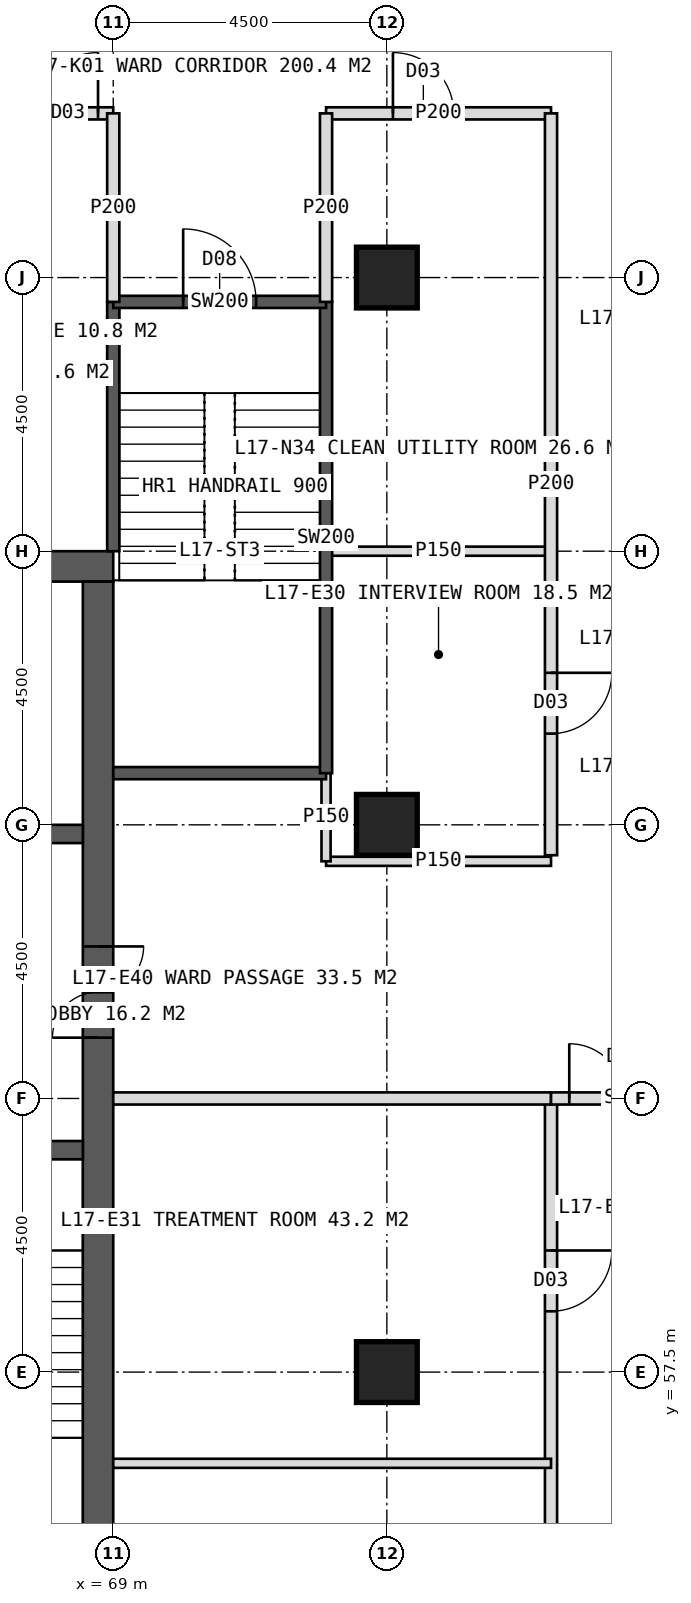
"""IFC4 building model, lengths in metres.
Left out: names, types, materials, properties, quantities, classifications, styles, units other than length and angle.
Written with IfcOpenShell. Run it as: python <this file> out.ifc"""

import sys

from ifc_helpers import new_model, si_unit, direction, frame, frame_2d, origin, origin_2d, place, context, subcontext, project, spatial, rectangle, hollow_rectangle, extrude, element, fill, save


model = new_model("IFC4")
c1 = context("Model", 3, precision=1e-05, world=origin(), true_north=direction((0.0, 1.0)))
c2 = subcontext(c1, "Body", "Model", "MODEL_VIEW")
j1 = project(units=[si_unit("LENGTHUNIT", "METRE"), si_unit("PLANEANGLEUNIT", "RADIAN")], contexts=[c1])
p1 = place(None, origin())
s1 = spatial("IfcSite", under=j1, at=p1, CompositionType="ELEMENT")
p2 = place(p1, origin())
s2 = spatial("IfcBuilding", under=s1, at=p2, CompositionType="ELEMENT")
p3 = place(p2, frame((0.0, 0.0, 75.0)))
s3 = spatial("IfcBuildingStorey", under=s2, at=p3, CompositionType="ELEMENT", Elevation=75.0)
p4 = place(p3, frame((51.0, 70.75, 0.0), z_axis=(0.0, 0.0, 1.0), x_axis=(1.0, 0.0, 0.0)))
e1 = element("IfcWall", 1, at=p4, inside=s3, PredefinedType="SHEAR", context=c2, shape_type="SweptSolid", body=[
    extrude(rectangle(XDim=18.0, YDim=0.5, at=frame_2d((9.0, 0.0))), origin(), (0.0, 0.0, 1.0), 4.0),
])
p5 = place(p4, frame((8.1, 0.0, 0.0)))
e2 = element("IfcOpeningElement", 2, at=p5, cuts=e1, PredefinedType="OPENING", context=c2, shape_type="SweptSolid", body=[
    extrude(rectangle(XDim=1.8, YDim=2.2, at=frame_2d((0.9, 1.1))), frame((0.0, 0.26, 0.0), z_axis=(0.0, -1.0, 0.0), x_axis=(1.0, 0.0, 0.0)), (0.0, 0.0, 1.0), 0.52),
])
p6 = place(p3, frame((68.75, 53.5, 0.0), z_axis=(0.0, 0.0, 1.0), x_axis=(0.0, 1.0, 0.0)))
e3 = element("IfcWall", 3, at=p6, inside=s3, PredefinedType="SHEAR", context=c2, shape_type="SweptSolid", body=[
    extrude(rectangle(XDim=17.0, YDim=0.5, at=frame_2d((8.5, 0.0))), origin(), (0.0, 0.0, 1.0), 4.0),
])
p7 = place(p6, frame((9.5, 0.0, 0.0)))
e4 = element("IfcOpeningElement", 4, at=p7, cuts=e3, PredefinedType="OPENING", context=c2, shape_type="SweptSolid", body=[
    extrude(rectangle(XDim=1.5, YDim=2.2, at=frame_2d((0.75, 1.1))), frame((0.0, 0.26, 0.0), z_axis=(0.0, -1.0, 0.0), x_axis=(1.0, 0.0, 0.0)), (0.0, 0.0, 1.0), 0.52),
])
p8 = place(p3, frame((65.2, 61.15, 0.0), z_axis=(0.0, 0.0, 1.0), x_axis=(1.0, 0.0, 0.0)))
e5 = element("IfcWall", 5, at=p8, inside=s3, PredefinedType="SHEAR", context=c2, shape_type="SweptSolid", body=[
    extrude(rectangle(XDim=3.3, YDim=0.3, at=frame_2d((1.65, 0.0))), origin(), (0.0, 0.0, 1.0), 4.0),
])
p9 = place(p8, frame((1.05, 0.0, 0.0)))
e6 = element("IfcOpeningElement", 6, at=p9, cuts=e5, PredefinedType="OPENING", context=c2, shape_type="SweptSolid", body=[
    extrude(rectangle(XDim=1.2, YDim=2.1, at=frame_2d((0.6, 1.05))), frame((0.0, 0.16, 0.0), z_axis=(0.0, -1.0, 0.0), x_axis=(1.0, 0.0, 0.0)), (0.0, 0.0, 1.0), 0.32),
])
p10 = place(p3, frame((65.2, 66.35, 0.0), z_axis=(0.0, 0.0, 1.0), x_axis=(1.0, 0.0, 0.0)))
e7 = element("IfcWall", 7, at=p10, inside=s3, PredefinedType="SHEAR", context=c2, shape_type="SweptSolid", body=[
    extrude(rectangle(XDim=3.3, YDim=0.3, at=frame_2d((1.65, 0.0))), origin(), (0.0, 0.0, 1.0), 4.0),
])
p11 = place(p10, frame((1.05, 0.0, 0.0)))
e8 = element("IfcOpeningElement", 8, at=p11, cuts=e7, PredefinedType="OPENING", context=c2, shape_type="SweptSolid", body=[
    extrude(rectangle(XDim=1.2, YDim=2.2, at=frame_2d((0.6, 1.1))), frame((0.0, 0.16, 0.0), z_axis=(0.0, -1.0, 0.0), x_axis=(1.0, 0.0, 0.0)), (0.0, 0.0, 1.0), 0.32),
])
for number, where, z_axis, x_axis in (
    (9, (73.5, 75.5, 0.0), (0.0, 0.0, 1.0), (1.0, 0.0, 0.0)),
    (10, (73.5, 57.5, 0.0), (0.0, 0.0, 1.0), (1.0, 0.0, 0.0)),
    (11, (73.5, 66.5, 0.0), (0.0, 0.0, 1.0), (1.0, 0.0, 0.0)),
):
    element("IfcColumn", number, at=place(p3, frame(where, z_axis=z_axis, x_axis=x_axis)), inside=s3, PredefinedType="COLUMN", context=c2, shape_type="SweptSolid", body=[
        extrude(hollow_rectangle(XDim=1.0, YDim=1.0, WallThickness=0.1, at=origin_2d()), origin(), (0.0, 0.0, 1.0), 4.0),
    ])
p12 = place(p3, frame((62.25, 78.2, 0.0), z_axis=(0.0, 0.0, 1.0), x_axis=(1.0, 0.0, 0.0)))
e12 = element("IfcWall", 12, at=p12, inside=s3, PredefinedType="PARTITIONING", context=c2, shape_type="SweptSolid", body=[
    extrude(rectangle(XDim=6.75, YDim=0.2, at=frame_2d((3.375, 0.0))), origin(), (0.0, 0.0, 1.0), 3.75),
])
p13 = place(p12, frame((2.125, 0.0, 0.0)))
e13 = element("IfcOpeningElement", 13, at=p13, cuts=e12, PredefinedType="OPENING", context=c2, shape_type="SweptSolid", body=[
    extrude(rectangle(XDim=1.0, YDim=2.1, at=frame_2d((0.5, 1.05))), frame((0.0, 0.11, 0.0), z_axis=(0.0, -1.0, 0.0), x_axis=(1.0, 0.0, 0.0)), (0.0, 0.0, 1.0), 0.22),
])
p14 = place(p12, frame((5.5, 0.0, 0.0)))
e14 = element("IfcOpeningElement", 14, at=p14, cuts=e12, PredefinedType="OPENING", context=c2, shape_type="SweptSolid", body=[
    extrude(rectangle(XDim=1.0, YDim=2.1, at=frame_2d((0.5, 1.05))), frame((0.0, 0.11, 0.0), z_axis=(0.0, -1.0, 0.0), x_axis=(1.0, 0.0, 0.0)), (0.0, 0.0, 1.0), 0.22),
])
p15 = place(p3, frame((72.5, 78.2, 0.0), z_axis=(0.0, 0.0, 1.0), x_axis=(1.0, 0.0, 0.0)))
e15 = element("IfcWall", 15, at=p15, inside=s3, PredefinedType="PARTITIONING", context=c2, shape_type="SweptSolid", body=[
    extrude(rectangle(XDim=3.7, YDim=0.2, at=frame_2d((1.85, 0.0))), origin(), (0.0, 0.0, 1.0), 3.75),
])
p16 = place(p15, frame((1.1, 0.0, 0.0)))
e16 = element("IfcOpeningElement", 16, at=p16, cuts=e15, PredefinedType="OPENING", context=c2, shape_type="SweptSolid", body=[
    extrude(rectangle(XDim=1.0, YDim=2.1, at=frame_2d((0.5, 1.05))), frame((0.0, 0.11, 0.0), z_axis=(0.0, -1.0, 0.0), x_axis=(1.0, 0.0, 0.0)), (0.0, 0.0, 1.0), 0.22),
])
p17 = place(p3, frame((72.5, 71.0, 0.0), z_axis=(0.0, 0.0, 1.0), x_axis=(1.0, 0.0, 0.0)))
e17 = element("IfcWall", 17, at=p17, inside=s3, PredefinedType="PARTITIONING", context=c2, shape_type="SweptSolid", body=[
    extrude(rectangle(XDim=3.7, YDim=0.15, at=frame_2d((1.85, 0.0))), origin(), (0.0, 0.0, 1.0), 3.75),
])
p18 = place(p3, frame((76.2, 78.2, 0.0), z_axis=(0.0, 0.0, 1.0), x_axis=(0.0, -1.0, 0.0)))
e18 = element("IfcWall", 18, at=p18, inside=s3, PredefinedType="PARTITIONING", context=c2, shape_type="SweptSolid", body=[
    extrude(rectangle(XDim=12.2, YDim=0.2, at=frame_2d((6.1, 0.0))), origin(), (0.0, 0.0, 1.0), 3.75),
])
p19 = place(p18, frame((9.2, 0.0, 0.0)))
e19 = element("IfcOpeningElement", 19, at=p19, cuts=e18, PredefinedType="OPENING", context=c2, shape_type="SweptSolid", body=[
    extrude(rectangle(XDim=1.0, YDim=2.1, at=frame_2d((0.5, 1.05))), frame((0.0, 0.11, 0.0), z_axis=(0.0, -1.0, 0.0), x_axis=(1.0, 0.0, 0.0)), (0.0, 0.0, 1.0), 0.22),
])
p20 = place(p3, frame((76.2, 62.0, 0.0), z_axis=(0.0, 0.0, 1.0), x_axis=(0.0, -1.0, 0.0)))
e20 = element("IfcWall", 20, at=p20, inside=s3, PredefinedType="PARTITIONING", context=c2, shape_type="SweptSolid", body=[
    extrude(rectangle(XDim=16.2, YDim=0.2, at=frame_2d((8.1, 0.0))), origin(), (0.0, 0.0, 1.0), 3.75),
])
p21 = place(p20, frame((2.5, 0.0, 0.0)))
e21 = element("IfcOpeningElement", 21, at=p21, cuts=e20, PredefinedType="OPENING", context=c2, shape_type="SweptSolid", body=[
    extrude(rectangle(XDim=1.0, YDim=2.1, at=frame_2d((0.5, 1.05))), frame((0.0, 0.11, 0.0), z_axis=(0.0, -1.0, 0.0), x_axis=(1.0, 0.0, 0.0)), (0.0, 0.0, 1.0), 0.22),
])
p22 = place(p20, frame((7.75, 0.0, 0.0)))
e22 = element("IfcOpeningElement", 22, at=p22, cuts=e20, PredefinedType="OPENING", context=c2, shape_type="SweptSolid", body=[
    extrude(rectangle(XDim=1.0, YDim=2.1, at=frame_2d((0.5, 1.05))), frame((0.0, 0.11, 0.0), z_axis=(0.0, -1.0, 0.0), x_axis=(1.0, 0.0, 0.0)), (0.0, 0.0, 1.0), 0.22),
])
p23 = place(p20, frame((12.85, 0.0, 0.0)))
e23 = element("IfcOpeningElement", 23, at=p23, cuts=e20, PredefinedType="OPENING", context=c2, shape_type="SweptSolid", body=[
    extrude(rectangle(XDim=1.0, YDim=2.1, at=frame_2d((0.5, 1.05))), frame((0.0, 0.11, 0.0), z_axis=(0.0, -1.0, 0.0), x_axis=(1.0, 0.0, 0.0)), (0.0, 0.0, 1.0), 0.22),
])
p24 = place(p3, frame((72.5, 65.9, 0.0), z_axis=(0.0, 0.0, 1.0), x_axis=(1.0, 0.0, 0.0)))
e24 = element("IfcWall", 24, at=p24, inside=s3, PredefinedType="PARTITIONING", context=c2, shape_type="SweptSolid", body=[
    extrude(rectangle(XDim=3.7, YDim=0.15, at=frame_2d((1.85, 0.0))), origin(), (0.0, 0.0, 1.0), 3.75),
])
p25 = place(p3, frame((69.0, 62.0, 0.0), z_axis=(0.0, 0.0, 1.0), x_axis=(1.0, 0.0, 0.0)))
e25 = element("IfcWall", 25, at=p25, inside=s3, PredefinedType="SOLIDWALL", context=c2, shape_type="SweptSolid", body=[
    extrude(rectangle(XDim=7.2, YDim=0.2, at=frame_2d((3.6, 0.0))), origin(), (0.0, 0.0, 1.0), 2.75),
])
p26 = place(p3, frame((69.0, 56.0, 0.0), z_axis=(0.0, 0.0, 1.0), x_axis=(1.0, 0.0, 0.0)))
e26 = element("IfcWall", 26, at=p26, inside=s3, PredefinedType="PARTITIONING", context=c2, shape_type="SweptSolid", body=[
    extrude(rectangle(XDim=7.2, YDim=0.15, at=frame_2d((3.6, 0.0))), origin(), (0.0, 0.0, 1.0), 3.75),
])
p27 = place(p3, frame((76.2, 62.0, 0.0), z_axis=(0.0, 0.0, 1.0), x_axis=(1.0, 0.0, 0.0)))
e27 = element("IfcWall", 27, at=p27, inside=s3, PredefinedType="SOLIDWALL", context=c2, shape_type="SweptSolid", body=[
    extrude(rectangle(XDim=2.7, YDim=0.2, at=frame_2d((1.35, 0.0))), origin(), (0.0, 0.0, 1.0), 2.75),
])
p28 = place(p27, frame((0.3, 0.0, 0.0)))
e28 = element("IfcOpeningElement", 28, at=p28, cuts=e27, PredefinedType="OPENING", context=c2, shape_type="SweptSolid", body=[
    extrude(rectangle(XDim=1.8, YDim=2.2, at=frame_2d((0.9, 1.1))), frame((0.0, 0.11, 0.0), z_axis=(0.0, -1.0, 0.0), x_axis=(1.0, 0.0, 0.0)), (0.0, 0.0, 1.0), 0.22),
])
p29 = place(p3, frame((72.5, 65.9, 0.0), z_axis=(0.0, 0.0, 1.0), x_axis=(0.0, 1.0, 0.0)))
e29 = element("IfcWall", 29, at=p29, inside=s3, PredefinedType="PARTITIONING", context=c2, shape_type="SweptSolid", body=[
    extrude(rectangle(XDim=1.45, YDim=0.15, at=frame_2d((0.725, 0.0))), origin(), (0.0, 0.0, 1.0), 3.75),
])
p30 = place(p3, frame((69.0, 71.0, 0.0), z_axis=(0.0, 0.0, 1.0), x_axis=(0.0, 1.0, 0.0)))
e30 = element("IfcWall", 30, at=p30, inside=s3, PredefinedType="SOLIDWALL", context=c2, shape_type="SweptSolid", body=[
    extrude(rectangle(XDim=4.1, YDim=0.2, at=frame_2d((2.05, 0.0))), origin(), (0.0, 0.0, 1.0), 3.75),
])
p31 = place(p3, frame((69.0, 67.35, 0.0), z_axis=(0.0, 0.0, 1.0), x_axis=(1.0, 0.0, 0.0)))
e31 = element("IfcWall", 31, at=p31, inside=s3, PredefinedType="SOLIDWALL", context=c2, shape_type="SweptSolid", body=[
    extrude(rectangle(XDim=3.5, YDim=0.2, at=frame_2d((1.75, 0.0))), origin(), (0.0, 0.0, 1.0), 3.75),
])
p32 = place(p3, frame((72.5, 67.35, 0.0), z_axis=(0.0, 0.0, 1.0), x_axis=(0.0, 1.0, 0.0)))
e32 = element("IfcWall", 32, at=p32, inside=s3, PredefinedType="SOLIDWALL", context=c2, shape_type="SweptSolid", body=[
    extrude(rectangle(XDim=7.75, YDim=0.2, at=frame_2d((3.875, 0.0))), origin(), (0.0, 0.0, 1.0), 3.75),
])
p33 = place(p3, frame((69.0, 75.1, 0.0), z_axis=(0.0, 0.0, 1.0), x_axis=(1.0, 0.0, 0.0)))
e33 = element("IfcWall", 33, at=p33, inside=s3, PredefinedType="SOLIDWALL", context=c2, shape_type="SweptSolid", body=[
    extrude(rectangle(XDim=3.5, YDim=0.2, at=frame_2d((1.75, 0.0))), origin(), (0.0, 0.0, 1.0), 3.75),
])
p34 = place(p33, frame((1.15, 0.0, 0.0)))
e34 = element("IfcOpeningElement", 34, at=p34, cuts=e33, PredefinedType="OPENING", context=c2, shape_type="SweptSolid", body=[
    extrude(rectangle(XDim=1.2, YDim=2.1, at=frame_2d((0.6, 1.05))), frame((0.0, 0.11, 0.0), z_axis=(0.0, -1.0, 0.0), x_axis=(1.0, 0.0, 0.0)), (0.0, 0.0, 1.0), 0.22),
])
for number, where, z_axis, x_axis in (
    (35, (69.0, 75.1, 0.0), (0.0, 0.0, 1.0), (0.0, 1.0, 0.0)),
    (36, (72.5, 75.1, 0.0), (0.0, 0.0, 1.0), (0.0, 1.0, 0.0)),
):
    element("IfcWall", number, at=place(p3, frame(where, z_axis=z_axis, x_axis=x_axis)), inside=s3, PredefinedType="PARTITIONING", context=c2, shape_type="SweptSolid", body=[
        extrude(rectangle(XDim=3.1, YDim=0.2, at=frame_2d((1.55, 0.0))), origin(), (0.0, 0.0, 1.0), 3.75),
    ])
p35 = place(p14, origin())
e37 = element("IfcDoor", 37, at=p35, inside=s3, OperationType="SINGLE_SWING_RIGHT", PredefinedType="DOOR", context=c2, shape_type="SweptSolid", body=[
    extrude(rectangle(XDim=1.0, YDim=2.1, at=frame_2d((0.5, 1.05))), frame((0.0, 0.025, 0.0), z_axis=(0.0, -1.0, 0.0), x_axis=(1.0, 0.0, 0.0)), (0.0, 0.0, 1.0), 0.05),
])
fill(e14, e37)
p36 = place(p16, origin())
e38 = element("IfcDoor", 38, at=p36, inside=s3, OperationType="SINGLE_SWING_LEFT", PredefinedType="DOOR", context=c2, shape_type="SweptSolid", body=[
    extrude(rectangle(XDim=1.0, YDim=2.1, at=frame_2d((0.5, 1.05))), frame((0.0, 0.025, 0.0), z_axis=(0.0, -1.0, 0.0), x_axis=(1.0, 0.0, 0.0)), (0.0, 0.0, 1.0), 0.05),
])
fill(e16, e38)
p37 = place(p19, origin())
e39 = element("IfcDoor", 39, at=p37, inside=s3, OperationType="SINGLE_SWING_LEFT", PredefinedType="DOOR", context=c2, shape_type="SweptSolid", body=[
    extrude(rectangle(XDim=1.0, YDim=2.1, at=frame_2d((0.5, 1.05))), frame((0.0, 0.025, 0.0), z_axis=(0.0, -1.0, 0.0), x_axis=(1.0, 0.0, 0.0)), (0.0, 0.0, 1.0), 0.05),
])
fill(e19, e39)
p38 = place(p21, origin())
e40 = element("IfcDoor", 40, at=p38, inside=s3, OperationType="SINGLE_SWING_LEFT", PredefinedType="DOOR", context=c2, shape_type="SweptSolid", body=[
    extrude(rectangle(XDim=1.0, YDim=2.1, at=frame_2d((0.5, 1.05))), frame((0.0, 0.025, 0.0), z_axis=(0.0, -1.0, 0.0), x_axis=(1.0, 0.0, 0.0)), (0.0, 0.0, 1.0), 0.05),
])
fill(e21, e40)
p39 = place(p28, origin())
e41 = element("IfcDoor", 41, at=p39, inside=s3, OperationType="DOUBLE_DOOR_DOUBLE_SWING", PredefinedType="DOOR", context=c2, shape_type="SweptSolid", body=[
    extrude(rectangle(XDim=1.8, YDim=2.2, at=frame_2d((0.9, 1.1))), frame((0.0, 0.025, 0.0), z_axis=(0.0, -1.0, 0.0), x_axis=(1.0, 0.0, 0.0)), (0.0, 0.0, 1.0), 0.05),
])
fill(e28, e41)
p40 = place(p7, origin())
e42 = element("IfcDoor", 42, at=p40, inside=s3, OperationType="DOUBLE_DOOR_SINGLE_SWING", PredefinedType="DOOR", context=c2, shape_type="SweptSolid", body=[
    extrude(rectangle(XDim=1.5, YDim=2.2, at=frame_2d((0.75, 1.1))), frame((0.0, 0.025, 0.0), z_axis=(0.0, -1.0, 0.0), x_axis=(1.0, 0.0, 0.0)), (0.0, 0.0, 1.0), 0.05),
])
fill(e4, e42)
p41 = place(p34, origin())
e43 = element("IfcDoor", 43, at=p41, inside=s3, OperationType="SINGLE_SWING_LEFT", PredefinedType="DOOR", context=c2, shape_type="SweptSolid", body=[
    extrude(rectangle(XDim=1.2, YDim=2.1, at=frame_2d((0.6, 1.05))), frame((0.0, 0.025, 0.0), z_axis=(0.0, -1.0, 0.0), x_axis=(1.0, 0.0, 0.0)), (0.0, 0.0, 1.0), 0.05),
])
fill(e34, e43)
save(model, sys.argv[1])
